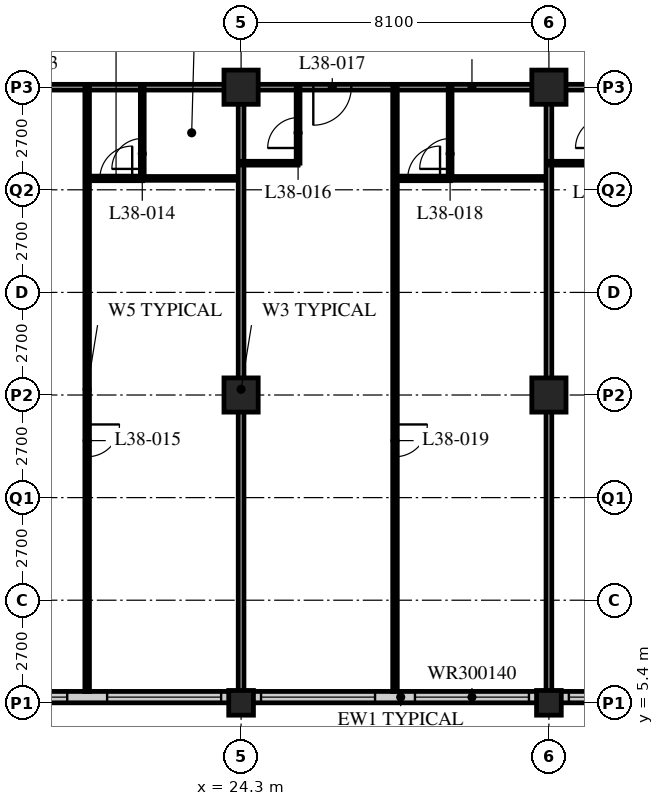
"""IFC4 building model, lengths in metres.
Left out: names, types, materials, properties, quantities, classifications, styles, units other than length and angle.
Written with IfcOpenShell. Run it as: python <this file> out.ifc"""

import sys

from ifc_helpers import new_model, si_unit, direction, frame, frame_2d, origin, origin_2d, place, context, subcontext, project, spatial, rectangle, hollow_rectangle, extrude, element, fill, save


model = new_model("IFC4")
c1 = context("Model", 3, precision=1e-05, world=origin(), true_north=direction((0.0, 1.0)))
c2 = subcontext(c1, "Body", "Model", "MODEL_VIEW")
j1 = project(units=[si_unit("LENGTHUNIT", "METRE"), si_unit("PLANEANGLEUNIT", "RADIAN")], contexts=[c1])
p1 = place(None, origin())
s1 = spatial("IfcSite", under=j1, at=p1, CompositionType="ELEMENT")
p2 = place(p1, origin())
s2 = spatial("IfcBuilding", under=s1, at=p2, CompositionType="ELEMENT")
p3 = place(p2, frame((0.0, 0.0, 147.6)))
s3 = spatial("IfcBuildingStorey", under=s2, at=p3, CompositionType="ELEMENT", Elevation=147.6)
p4 = place(p3, frame((24.3, 5.4, 0.0), z_axis=(0.0, 0.0, 1.0), x_axis=(1.0, 0.0, 0.0)))
e1 = element("IfcColumn", 1, at=p4, inside=s3, PredefinedType="COLUMN", context=c2, shape_type="SweptSolid", body=[
    extrude(hollow_rectangle(XDim=0.65, YDim=0.65, WallThickness=0.055, at=origin_2d()), origin(), (0.0, 0.0, 1.0), 3.4),
])
for number, where, z_axis, x_axis in (
    (2, (24.3, 13.5, 0.0), (0.0, 0.0, 1.0), (1.0, 0.0, 0.0)),
    (3, (24.3, 21.6, 0.0), (0.0, 0.0, 1.0), (1.0, 0.0, 0.0)),
):
    element("IfcColumn", number, at=place(p3, frame(where, z_axis=z_axis, x_axis=x_axis)), inside=s3, PredefinedType="COLUMN", context=c2, shape_type="SweptSolid", body=[
        extrude(hollow_rectangle(XDim=0.9, YDim=0.9, WallThickness=0.1, at=origin_2d()), origin(), (0.0, 0.0, 1.0), 3.4),
    ])
p5 = place(p3, frame((32.4, 5.4, 0.0), z_axis=(0.0, 0.0, 1.0), x_axis=(1.0, 0.0, 0.0)))
e4 = element("IfcColumn", 4, at=p5, inside=s3, PredefinedType="COLUMN", context=c2, shape_type="SweptSolid", body=[
    extrude(hollow_rectangle(XDim=0.65, YDim=0.65, WallThickness=0.055, at=origin_2d()), origin(), (0.0, 0.0, 1.0), 3.4),
])
for number, where, z_axis, x_axis in (
    (5, (32.4, 13.5, 0.0), (0.0, 0.0, 1.0), (1.0, 0.0, 0.0)),
    (6, (32.4, 21.6, 0.0), (0.0, 0.0, 1.0), (1.0, 0.0, 0.0)),
):
    element("IfcColumn", number, at=place(p3, frame(where, z_axis=z_axis, x_axis=x_axis)), inside=s3, PredefinedType="COLUMN", context=c2, shape_type="SweptSolid", body=[
        extrude(hollow_rectangle(XDim=0.9, YDim=0.9, WallThickness=0.1, at=origin_2d()), origin(), (0.0, 0.0, 1.0), 3.4),
    ])
p6 = place(p3, frame((8.4, 5.55, 0.0), z_axis=(0.0, 0.0, 1.0), x_axis=(1.0, 0.0, 0.0)))
e7 = element("IfcWall", 7, at=p6, inside=s3, PredefinedType="SOLIDWALL", context=c2, shape_type="SweptSolid", body=[
    extrude(rectangle(XDim=40.2, YDim=0.3, at=frame_2d((20.1, 0.0))), origin(), (0.0, 0.0, 1.0), 3.19),
])
p7 = place(p6, frame((0.225, 0.0, 0.9)))
e8 = element("IfcOpeningElement", 8, at=p7, cuts=e7, PredefinedType="OPENING", context=c2, shape_type="SweptSolid", body=[
    extrude(rectangle(XDim=3.0, YDim=1.4, at=frame_2d((1.5, 0.7))), frame((0.0, 0.16, 0.0), z_axis=(0.0, -1.0, 0.0), x_axis=(1.0, 0.0, 0.0)), (0.0, 0.0, 1.0), 0.32),
])
p8 = place(p6, frame((4.275, 0.0, 0.9)))
e9 = element("IfcOpeningElement", 9, at=p8, cuts=e7, PredefinedType="OPENING", context=c2, shape_type="SweptSolid", body=[
    extrude(rectangle(XDim=3.0, YDim=1.4, at=frame_2d((1.5, 0.7))), frame((0.0, 0.16, 0.0), z_axis=(0.0, -1.0, 0.0), x_axis=(1.0, 0.0, 0.0)), (0.0, 0.0, 1.0), 0.32),
])
p9 = place(p6, frame((8.325, 0.0, 0.9)))
e10 = element("IfcOpeningElement", 10, at=p9, cuts=e7, PredefinedType="OPENING", context=c2, shape_type="SweptSolid", body=[
    extrude(rectangle(XDim=3.0, YDim=1.4, at=frame_2d((1.5, 0.7))), frame((0.0, 0.16, 0.0), z_axis=(0.0, -1.0, 0.0), x_axis=(1.0, 0.0, 0.0)), (0.0, 0.0, 1.0), 0.32),
])
p10 = place(p6, frame((12.375, 0.0, 0.9)))
e11 = element("IfcOpeningElement", 11, at=p10, cuts=e7, PredefinedType="OPENING", context=c2, shape_type="SweptSolid", body=[
    extrude(rectangle(XDim=3.0, YDim=1.4, at=frame_2d((1.5, 0.7))), frame((0.0, 0.16, 0.0), z_axis=(0.0, -1.0, 0.0), x_axis=(1.0, 0.0, 0.0)), (0.0, 0.0, 1.0), 0.32),
])
p11 = place(p6, frame((16.425, 0.0, 0.9)))
e12 = element("IfcOpeningElement", 12, at=p11, cuts=e7, PredefinedType="OPENING", context=c2, shape_type="SweptSolid", body=[
    extrude(rectangle(XDim=3.0, YDim=1.4, at=frame_2d((1.5, 0.7))), frame((0.0, 0.16, 0.0), z_axis=(0.0, -1.0, 0.0), x_axis=(1.0, 0.0, 0.0)), (0.0, 0.0, 1.0), 0.32),
])
p12 = place(p6, frame((20.475, 0.0, 0.9)))
e13 = element("IfcOpeningElement", 13, at=p12, cuts=e7, PredefinedType="OPENING", context=c2, shape_type="SweptSolid", body=[
    extrude(rectangle(XDim=3.0, YDim=1.4, at=frame_2d((1.5, 0.7))), frame((0.0, 0.16, 0.0), z_axis=(0.0, -1.0, 0.0), x_axis=(1.0, 0.0, 0.0)), (0.0, 0.0, 1.0), 0.32),
])
p13 = place(p6, frame((24.525, 0.0, 0.9)))
e14 = element("IfcOpeningElement", 14, at=p13, cuts=e7, PredefinedType="OPENING", context=c2, shape_type="SweptSolid", body=[
    extrude(rectangle(XDim=3.0, YDim=1.4, at=frame_2d((1.5, 0.7))), frame((0.0, 0.16, 0.0), z_axis=(0.0, -1.0, 0.0), x_axis=(1.0, 0.0, 0.0)), (0.0, 0.0, 1.0), 0.32),
])
p14 = place(p6, frame((28.575, 0.0, 0.9)))
e15 = element("IfcOpeningElement", 15, at=p14, cuts=e7, PredefinedType="OPENING", context=c2, shape_type="SweptSolid", body=[
    extrude(rectangle(XDim=3.0, YDim=1.4, at=frame_2d((1.5, 0.7))), frame((0.0, 0.16, 0.0), z_axis=(0.0, -1.0, 0.0), x_axis=(1.0, 0.0, 0.0)), (0.0, 0.0, 1.0), 0.32),
])
p15 = place(p6, frame((32.625, 0.0, 0.9)))
e16 = element("IfcOpeningElement", 16, at=p15, cuts=e7, PredefinedType="OPENING", context=c2, shape_type="SweptSolid", body=[
    extrude(rectangle(XDim=3.0, YDim=1.4, at=frame_2d((1.5, 0.7))), frame((0.0, 0.16, 0.0), z_axis=(0.0, -1.0, 0.0), x_axis=(1.0, 0.0, 0.0)), (0.0, 0.0, 1.0), 0.32),
])
p16 = place(p6, frame((36.675, 0.0, 0.9)))
e17 = element("IfcOpeningElement", 17, at=p16, cuts=e7, PredefinedType="OPENING", context=c2, shape_type="SweptSolid", body=[
    extrude(rectangle(XDim=3.0, YDim=1.4, at=frame_2d((1.5, 0.7))), frame((0.0, 0.16, 0.0), z_axis=(0.0, -1.0, 0.0), x_axis=(1.0, 0.0, 0.0)), (0.0, 0.0, 1.0), 0.32),
])
p17 = place(p3, frame((12.15, 21.6, 0.0), z_axis=(0.0, 0.0, 1.0), x_axis=(1.0, 0.0, 0.0)))
e18 = element("IfcWall", 18, at=p17, inside=s3, PredefinedType="PARTITIONING", context=c2, shape_type="SweptSolid", body=[
    extrude(rectangle(XDim=36.45, YDim=0.15, at=frame_2d((18.225, 0.0))), origin(), (0.0, 0.0, 1.0), 2.42),
])
p18 = place(p17, frame((5.95, 0.0, 0.0)))
e19 = element("IfcOpeningElement", 19, at=p18, cuts=e18, PredefinedType="OPENING", context=c2, shape_type="SweptSolid", body=[
    extrude(rectangle(XDim=1.0, YDim=2.1, at=frame_2d((0.5, 1.05))), frame((0.0, 0.085, 0.0), z_axis=(0.0, -1.0, 0.0), x_axis=(1.0, 0.0, 0.0)), (0.0, 0.0, 1.0), 0.17),
])
p19 = place(p17, frame((14.05, 0.0, 0.0)))
e20 = element("IfcOpeningElement", 20, at=p19, cuts=e18, PredefinedType="OPENING", context=c2, shape_type="SweptSolid", body=[
    extrude(rectangle(XDim=1.0, YDim=2.1, at=frame_2d((0.5, 1.05))), frame((0.0, 0.085, 0.0), z_axis=(0.0, -1.0, 0.0), x_axis=(1.0, 0.0, 0.0)), (0.0, 0.0, 1.0), 0.17),
])
p20 = place(p17, frame((22.15, 0.0, 0.0)))
e21 = element("IfcOpeningElement", 21, at=p20, cuts=e18, PredefinedType="OPENING", context=c2, shape_type="SweptSolid", body=[
    extrude(rectangle(XDim=1.0, YDim=2.1, at=frame_2d((0.5, 1.05))), frame((0.0, 0.085, 0.0), z_axis=(0.0, -1.0, 0.0), x_axis=(1.0, 0.0, 0.0)), (0.0, 0.0, 1.0), 0.17),
])
p21 = place(p17, frame((30.8, 0.0, 0.0)))
e22 = element("IfcOpeningElement", 22, at=p21, cuts=e18, PredefinedType="OPENING", context=c2, shape_type="SweptSolid", body=[
    extrude(rectangle(XDim=1.0, YDim=2.1, at=frame_2d((0.5, 1.05))), frame((0.0, 0.085, 0.0), z_axis=(0.0, -1.0, 0.0), x_axis=(1.0, 0.0, 0.0)), (0.0, 0.0, 1.0), 0.17),
])
p22 = place(p17, frame((1.525, 0.0, 0.0)))
e23 = element("IfcOpeningElement", 23, at=p22, cuts=e18, PredefinedType="OPENING", context=c2, shape_type="SweptSolid", body=[
    extrude(rectangle(XDim=1.0, YDim=2.1, at=frame_2d((0.5, 1.05))), frame((0.0, 0.085, 0.0), z_axis=(0.0, -1.0, 0.0), x_axis=(1.0, 0.0, 0.0)), (0.0, 0.0, 1.0), 0.17),
])
p23 = place(p17, frame((33.925, 0.0, 0.0)))
e24 = element("IfcOpeningElement", 24, at=p23, cuts=e18, PredefinedType="OPENING", context=c2, shape_type="SweptSolid", body=[
    extrude(rectangle(XDim=1.0, YDim=2.1, at=frame_2d((0.5, 1.05))), frame((0.0, 0.085, 0.0), z_axis=(0.0, -1.0, 0.0), x_axis=(1.0, 0.0, 0.0)), (0.0, 0.0, 1.0), 0.17),
])
p24 = place(p3, frame((21.7, 19.2, 0.0), z_axis=(0.0, 0.0, 1.0), x_axis=(1.0, 0.0, 0.0)))
e25 = element("IfcWall", 25, at=p24, inside=s3, PredefinedType="PARTITIONING", context=c2, shape_type="SweptSolid", body=[
    extrude(rectangle(XDim=2.6, YDim=0.1, at=frame_2d((1.3, 0.0))), origin(), (0.0, 0.0, 1.0), 3.19),
])
p25 = place(p3, frame((21.7, 21.6, 0.0), z_axis=(0.0, 0.0, 1.0), x_axis=(0.0, -1.0, 0.0)))
e26 = element("IfcWall", 26, at=p25, inside=s3, PredefinedType="PARTITIONING", context=c2, shape_type="SweptSolid", body=[
    extrude(rectangle(XDim=2.4, YDim=0.1, at=frame_2d((1.2, 0.0))), origin(), (0.0, 0.0, 1.0), 3.19),
])
p26 = place(p25, frame((1.35, 0.0, 0.0)))
e27 = element("IfcOpeningElement", 27, at=p26, cuts=e26, PredefinedType="OPENING", context=c2, shape_type="SweptSolid", body=[
    extrude(rectangle(XDim=0.8, YDim=2.1, at=frame_2d((0.4, 1.05))), frame((0.0, 0.06, 0.0), z_axis=(0.0, -1.0, 0.0), x_axis=(1.0, 0.0, 0.0)), (0.0, 0.0, 1.0), 0.12),
])
p27 = place(p3, frame((20.25, 21.6, 0.0), z_axis=(0.0, 0.0, 1.0), x_axis=(0.0, -1.0, 0.0)))
e28 = element("IfcWall", 28, at=p27, inside=s3, PredefinedType="PARTITIONING", context=c2, shape_type="SweptSolid", body=[
    extrude(rectangle(XDim=15.9, YDim=0.12, at=frame_2d((7.95, 0.0))), origin(), (0.0, 0.0, 1.0), 3.19),
])
p28 = place(p27, frame((8.875, 0.0, 0.0)))
e29 = element("IfcOpeningElement", 29, at=p28, cuts=e28, PredefinedType="OPENING", context=c2, shape_type="SweptSolid", body=[
    extrude(rectangle(XDim=0.85, YDim=2.1, at=frame_2d((0.425, 1.05))), frame((0.0, 0.07, 0.0), z_axis=(0.0, -1.0, 0.0), x_axis=(1.0, 0.0, 0.0)), (0.0, 0.0, 1.0), 0.14),
])
p29 = place(p3, frame((24.3, 21.6, 0.0), z_axis=(0.0, 0.0, 1.0), x_axis=(0.0, -1.0, 0.0)))
e30 = element("IfcWall", 30, at=p29, inside=s3, PredefinedType="PARTITIONING", context=c2, shape_type="SweptSolid", body=[
    extrude(rectangle(XDim=15.9, YDim=0.15, at=frame_2d((7.95, 0.0))), origin(), (0.0, 0.0, 1.0), 2.42),
])
p30 = place(p3, frame((24.3, 19.6, 0.0), z_axis=(0.0, 0.0, 1.0), x_axis=(1.0, 0.0, 0.0)))
e31 = element("IfcWall", 31, at=p30, inside=s3, PredefinedType="PARTITIONING", context=c2, shape_type="SweptSolid", body=[
    extrude(rectangle(XDim=1.5, YDim=0.1, at=frame_2d((0.75, 0.0))), origin(), (0.0, 0.0, 1.0), 3.19),
])
p31 = place(p3, frame((25.8, 21.6, 0.0), z_axis=(0.0, 0.0, 1.0), x_axis=(0.0, -1.0, 0.0)))
e32 = element("IfcWall", 32, at=p31, inside=s3, PredefinedType="PARTITIONING", context=c2, shape_type="SweptSolid", body=[
    extrude(rectangle(XDim=2.0, YDim=0.1, at=frame_2d((1.0, 0.0))), origin(), (0.0, 0.0, 1.0), 3.19),
])
p32 = place(p31, frame((0.8, 0.0, 0.0)))
e33 = element("IfcOpeningElement", 33, at=p32, cuts=e32, PredefinedType="OPENING", context=c2, shape_type="SweptSolid", body=[
    extrude(rectangle(XDim=0.8, YDim=2.1, at=frame_2d((0.4, 1.05))), frame((0.0, 0.06, 0.0), z_axis=(0.0, -1.0, 0.0), x_axis=(1.0, 0.0, 0.0)), (0.0, 0.0, 1.0), 0.12),
])
p33 = place(p3, frame((29.8, 19.2, 0.0), z_axis=(0.0, 0.0, 1.0), x_axis=(1.0, 0.0, 0.0)))
e34 = element("IfcWall", 34, at=p33, inside=s3, PredefinedType="PARTITIONING", context=c2, shape_type="SweptSolid", body=[
    extrude(rectangle(XDim=2.6, YDim=0.1, at=frame_2d((1.3, 0.0))), origin(), (0.0, 0.0, 1.0), 3.19),
])
p34 = place(p3, frame((29.8, 21.6, 0.0), z_axis=(0.0, 0.0, 1.0), x_axis=(0.0, -1.0, 0.0)))
e35 = element("IfcWall", 35, at=p34, inside=s3, PredefinedType="PARTITIONING", context=c2, shape_type="SweptSolid", body=[
    extrude(rectangle(XDim=2.4, YDim=0.1, at=frame_2d((1.2, 0.0))), origin(), (0.0, 0.0, 1.0), 3.19),
])
p35 = place(p34, frame((1.35, 0.0, 0.0)))
e36 = element("IfcOpeningElement", 36, at=p35, cuts=e35, PredefinedType="OPENING", context=c2, shape_type="SweptSolid", body=[
    extrude(rectangle(XDim=0.8, YDim=2.1, at=frame_2d((0.4, 1.05))), frame((0.0, 0.06, 0.0), z_axis=(0.0, -1.0, 0.0), x_axis=(1.0, 0.0, 0.0)), (0.0, 0.0, 1.0), 0.12),
])
p36 = place(p3, frame((28.35, 21.6, 0.0), z_axis=(0.0, 0.0, 1.0), x_axis=(0.0, -1.0, 0.0)))
e37 = element("IfcWall", 37, at=p36, inside=s3, PredefinedType="PARTITIONING", context=c2, shape_type="SweptSolid", body=[
    extrude(rectangle(XDim=15.9, YDim=0.12, at=frame_2d((7.95, 0.0))), origin(), (0.0, 0.0, 1.0), 3.19),
])
p37 = place(p36, frame((8.875, 0.0, 0.0)))
e38 = element("IfcOpeningElement", 38, at=p37, cuts=e37, PredefinedType="OPENING", context=c2, shape_type="SweptSolid", body=[
    extrude(rectangle(XDim=0.85, YDim=2.1, at=frame_2d((0.425, 1.05))), frame((0.0, 0.07, 0.0), z_axis=(0.0, -1.0, 0.0), x_axis=(1.0, 0.0, 0.0)), (0.0, 0.0, 1.0), 0.14),
])
p38 = place(p3, frame((32.4, 21.6, 0.0), z_axis=(0.0, 0.0, 1.0), x_axis=(0.0, -1.0, 0.0)))
e39 = element("IfcWall", 39, at=p38, inside=s3, PredefinedType="PARTITIONING", context=c2, shape_type="SweptSolid", body=[
    extrude(rectangle(XDim=15.9, YDim=0.15, at=frame_2d((7.95, 0.0))), origin(), (0.0, 0.0, 1.0), 2.42),
])
p39 = place(p3, frame((32.4, 19.6, 0.0), z_axis=(0.0, 0.0, 1.0), x_axis=(1.0, 0.0, 0.0)))
e40 = element("IfcWall", 40, at=p39, inside=s3, PredefinedType="PARTITIONING", context=c2, shape_type="SweptSolid", body=[
    extrude(rectangle(XDim=1.5, YDim=0.1, at=frame_2d((0.75, 0.0))), origin(), (0.0, 0.0, 1.0), 3.19),
])
p40 = place(p3, frame((21.71, 19.2, 0.0), z_axis=(0.0, 0.0, 1.0), x_axis=(-1.0, 0.0, 0.0)))
e41 = element("IfcWall", 41, at=p40, inside=s3, PredefinedType="PARTITIONING", context=c2, shape_type="SweptSolid", body=[
    extrude(rectangle(XDim=1.46, YDim=0.12, at=frame_2d((0.73, 0.0))), origin(), (0.0, 0.0, 1.0), 3.19),
])
p41 = place(p40, frame((0.275, 0.0, 0.0)))
e42 = element("IfcOpeningElement", 42, at=p41, cuts=e41, PredefinedType="OPENING", context=c2, shape_type="SweptSolid", body=[
    extrude(rectangle(XDim=0.85, YDim=2.1, at=frame_2d((0.425, 1.05))), frame((0.0, 0.07, 0.0), z_axis=(0.0, -1.0, 0.0), x_axis=(1.0, 0.0, 0.0)), (0.0, 0.0, 1.0), 0.14),
])
p42 = place(p3, frame((29.81, 19.2, 0.0), z_axis=(0.0, 0.0, 1.0), x_axis=(-1.0, 0.0, 0.0)))
e43 = element("IfcWall", 43, at=p42, inside=s3, PredefinedType="PARTITIONING", context=c2, shape_type="SweptSolid", body=[
    extrude(rectangle(XDim=1.46, YDim=0.12, at=frame_2d((0.73, 0.0))), origin(), (0.0, 0.0, 1.0), 3.19),
])
p43 = place(p42, frame((0.275, 0.0, 0.0)))
e44 = element("IfcOpeningElement", 44, at=p43, cuts=e43, PredefinedType="OPENING", context=c2, shape_type="SweptSolid", body=[
    extrude(rectangle(XDim=0.85, YDim=2.1, at=frame_2d((0.425, 1.05))), frame((0.0, 0.07, 0.0), z_axis=(0.0, -1.0, 0.0), x_axis=(1.0, 0.0, 0.0)), (0.0, 0.0, 1.0), 0.14),
])
p44 = place(p9, origin())
e45 = element("IfcWindow", 45, at=p44, inside=s3, PartitioningType="SINGLE_PANEL", PredefinedType="WINDOW", context=c2, shape_type="SweptSolid", body=[
    extrude(rectangle(XDim=3.0, YDim=1.4, at=frame_2d((1.5, 0.7))), frame((0.0, 0.03, 0.0), z_axis=(0.0, -1.0, 0.0), x_axis=(1.0, 0.0, 0.0)), (0.0, 0.0, 1.0), 0.06),
])
fill(e10, e45)
p45 = place(p10, origin())
e46 = element("IfcWindow", 46, at=p45, inside=s3, PartitioningType="SINGLE_PANEL", PredefinedType="WINDOW", context=c2, shape_type="SweptSolid", body=[
    extrude(rectangle(XDim=3.0, YDim=1.4, at=frame_2d((1.5, 0.7))), frame((0.0, 0.03, 0.0), z_axis=(0.0, -1.0, 0.0), x_axis=(1.0, 0.0, 0.0)), (0.0, 0.0, 1.0), 0.06),
])
fill(e11, e46)
p46 = place(p11, origin())
e47 = element("IfcWindow", 47, at=p46, inside=s3, PartitioningType="SINGLE_PANEL", PredefinedType="WINDOW", context=c2, shape_type="SweptSolid", body=[
    extrude(rectangle(XDim=3.0, YDim=1.4, at=frame_2d((1.5, 0.7))), frame((0.0, 0.03, 0.0), z_axis=(0.0, -1.0, 0.0), x_axis=(1.0, 0.0, 0.0)), (0.0, 0.0, 1.0), 0.06),
])
fill(e12, e47)
p47 = place(p12, origin())
e48 = element("IfcWindow", 48, at=p47, inside=s3, PartitioningType="SINGLE_PANEL", PredefinedType="WINDOW", context=c2, shape_type="SweptSolid", body=[
    extrude(rectangle(XDim=3.0, YDim=1.4, at=frame_2d((1.5, 0.7))), frame((0.0, 0.03, 0.0), z_axis=(0.0, -1.0, 0.0), x_axis=(1.0, 0.0, 0.0)), (0.0, 0.0, 1.0), 0.06),
])
fill(e13, e48)
p48 = place(p13, origin())
e49 = element("IfcWindow", 49, at=p48, inside=s3, PartitioningType="SINGLE_PANEL", PredefinedType="WINDOW", context=c2, shape_type="SweptSolid", body=[
    extrude(rectangle(XDim=3.0, YDim=1.4, at=frame_2d((1.5, 0.7))), frame((0.0, 0.03, 0.0), z_axis=(0.0, -1.0, 0.0), x_axis=(1.0, 0.0, 0.0)), (0.0, 0.0, 1.0), 0.06),
])
fill(e14, e49)
p49 = place(p26, origin())
e50 = element("IfcDoor", 50, at=p49, inside=s3, OperationType="SINGLE_SWING_LEFT", PredefinedType="DOOR", context=c2, shape_type="SweptSolid", body=[
    extrude(rectangle(XDim=0.8, YDim=2.1, at=frame_2d((0.4, 1.05))), frame((0.0, 0.025, 0.0), z_axis=(0.0, -1.0, 0.0), x_axis=(1.0, 0.0, 0.0)), (0.0, 0.0, 1.0), 0.05),
])
fill(e27, e50)
p50 = place(p28, origin())
e51 = element("IfcDoor", 51, at=p50, inside=s3, OperationType="SINGLE_SWING_LEFT", PredefinedType="DOOR", context=c2, shape_type="SweptSolid", body=[
    extrude(rectangle(XDim=0.85, YDim=2.1, at=frame_2d((0.425, 1.05))), frame((0.0, 0.025, 0.0), z_axis=(0.0, -1.0, 0.0), x_axis=(1.0, 0.0, 0.0)), (0.0, 0.0, 1.0), 0.05),
])
fill(e29, e51)
p51 = place(p32, origin())
e52 = element("IfcDoor", 52, at=p51, inside=s3, OperationType="SINGLE_SWING_LEFT", PredefinedType="DOOR", context=c2, shape_type="SweptSolid", body=[
    extrude(rectangle(XDim=0.8, YDim=2.1, at=frame_2d((0.4, 1.05))), frame((0.0, 0.025, 0.0), z_axis=(0.0, -1.0, 0.0), x_axis=(1.0, 0.0, 0.0)), (0.0, 0.0, 1.0), 0.05),
])
fill(e33, e52)
p52 = place(p19, origin())
e53 = element("IfcDoor", 53, at=p52, inside=s3, OperationType="SINGLE_SWING_RIGHT", PredefinedType="DOOR", context=c2, shape_type="SweptSolid", body=[
    extrude(rectangle(XDim=1.0, YDim=2.1, at=frame_2d((0.5, 1.05))), frame((0.0, 0.025, 0.0), z_axis=(0.0, -1.0, 0.0), x_axis=(1.0, 0.0, 0.0)), (0.0, 0.0, 1.0), 0.05),
])
fill(e20, e53)
p53 = place(p35, origin())
e54 = element("IfcDoor", 54, at=p53, inside=s3, OperationType="SINGLE_SWING_LEFT", PredefinedType="DOOR", context=c2, shape_type="SweptSolid", body=[
    extrude(rectangle(XDim=0.8, YDim=2.1, at=frame_2d((0.4, 1.05))), frame((0.0, 0.025, 0.0), z_axis=(0.0, -1.0, 0.0), x_axis=(1.0, 0.0, 0.0)), (0.0, 0.0, 1.0), 0.05),
])
fill(e36, e54)
p54 = place(p37, origin())
e55 = element("IfcDoor", 55, at=p54, inside=s3, OperationType="SINGLE_SWING_LEFT", PredefinedType="DOOR", context=c2, shape_type="SweptSolid", body=[
    extrude(rectangle(XDim=0.85, YDim=2.1, at=frame_2d((0.425, 1.05))), frame((0.0, 0.025, 0.0), z_axis=(0.0, -1.0, 0.0), x_axis=(1.0, 0.0, 0.0)), (0.0, 0.0, 1.0), 0.05),
])
fill(e38, e55)
p55 = place(p41, origin())
e56 = element("IfcDoor", 56, at=p55, inside=s3, OperationType="SINGLE_SWING_RIGHT", PredefinedType="DOOR", context=c2, shape_type="SweptSolid", body=[
    extrude(rectangle(XDim=0.85, YDim=2.1, at=frame_2d((0.425, 1.05))), frame((0.0, 0.025, 0.0), z_axis=(0.0, -1.0, 0.0), x_axis=(1.0, 0.0, 0.0)), (0.0, 0.0, 1.0), 0.05),
])
fill(e42, e56)
p56 = place(p43, origin())
e57 = element("IfcDoor", 57, at=p56, inside=s3, OperationType="SINGLE_SWING_RIGHT", PredefinedType="DOOR", context=c2, shape_type="SweptSolid", body=[
    extrude(rectangle(XDim=0.85, YDim=2.1, at=frame_2d((0.425, 1.05))), frame((0.0, 0.025, 0.0), z_axis=(0.0, -1.0, 0.0), x_axis=(1.0, 0.0, 0.0)), (0.0, 0.0, 1.0), 0.05),
])
fill(e44, e57)
save(model, sys.argv[1])
